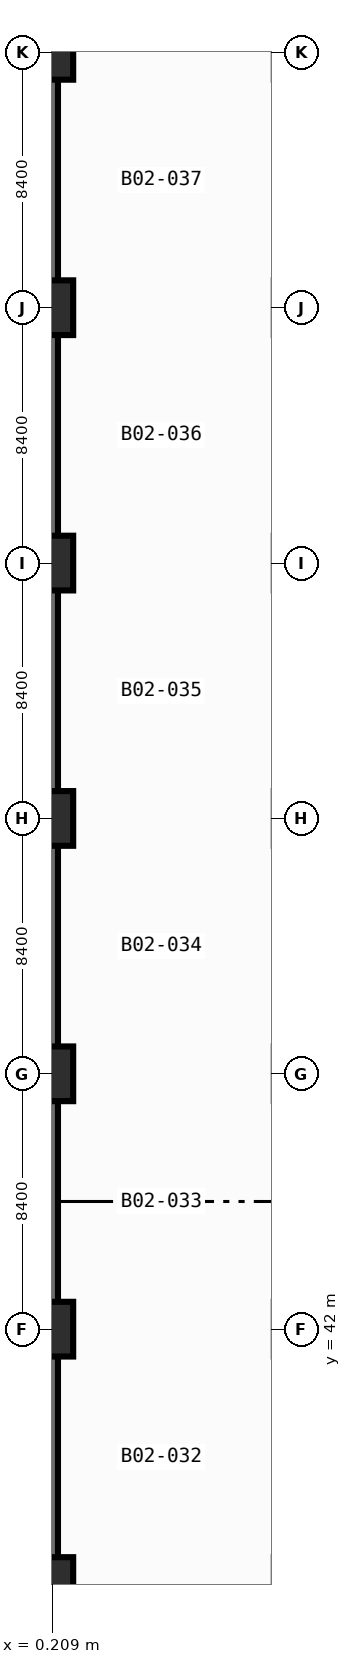
"""IFC4 building model, lengths in metres.
Left out: names, types, materials, properties, quantities, classifications, styles, units other than length and angle.
Written with IfcOpenShell. Run it as: python <this file> out.ifc"""

import sys

from ifc_helpers import new_model, si_unit, direction, frame, frame_2d, origin, origin_2d, place, context, subcontext, project, spatial, rectangle, extrude, element, save


model = new_model("IFC4")
c1 = context("Model", 3, precision=1e-05, world=origin(), true_north=direction((0.0, 1.0)))
c2 = subcontext(c1, "Body", "Model", "MODEL_VIEW")
j1 = project(units=[si_unit("LENGTHUNIT", "METRE"), si_unit("PLANEANGLEUNIT", "RADIAN")], contexts=[c1])
p1 = place(None, origin())
s1 = spatial("IfcSite", under=j1, at=p1, CompositionType="ELEMENT")
p2 = place(p1, origin())
s2 = spatial("IfcBuilding", under=s1, at=p2, CompositionType="ELEMENT")
p3 = place(p2, frame((0.0, 0.0, -8.4)))
s3 = spatial("IfcBuildingStorey", under=s2, at=p3, CompositionType="ELEMENT", Elevation=-8.4)
p4 = place(p3, frame((0.0, 92.0, 0.0), z_axis=(0.0, 0.0, 1.0), x_axis=(0.0, -1.0, 0.0)))
e1 = element("IfcWall", 1, at=p4, inside=s3, PredefinedType="USERDEFINED", context=c2, shape_type="SweptSolid", body=[
    extrude(rectangle(XDim=91.6, YDim=0.8, at=frame_2d((45.8, 0.0))), origin(), (0.0, 0.0, 1.0), 3.85),
])
for number, where, z_axis, x_axis in (
    (2, (0.0, 33.6, 0.0), (0.0, 0.0, 1.0), (1.0, 0.0, 0.0)),
    (3, (0.0, 42.0, 0.0), (0.0, 0.0, 1.0), (1.0, 0.0, 0.0)),
    (4, (0.0, 50.4, 0.0), (0.0, 0.0, 1.0), (1.0, 0.0, 0.0)),
    (5, (0.0, 58.8, 0.0), (0.0, 0.0, 1.0), (1.0, 0.0, 0.0)),
    (6, (0.0, 67.2, 0.0), (0.0, 0.0, 1.0), (1.0, 0.0, 0.0)),
    (7, (0.0, 75.6, 0.0), (0.0, 0.0, 1.0), (1.0, 0.0, 0.0)),
    (8, (0.0, 84.0, 0.0), (0.0, 0.0, 1.0), (1.0, 0.0, 0.0)),
):
    element("IfcColumn", number, at=place(p3, frame(where, z_axis=z_axis, x_axis=x_axis)), inside=s3, PredefinedType="COLUMN", context=c2, shape_type="SweptSolid", body=[
        extrude(rectangle(XDim=1.8, YDim=1.8, at=origin_2d()), origin(), (0.0, 0.0, 1.0), 4.2),
    ])
save(model, sys.argv[1])
